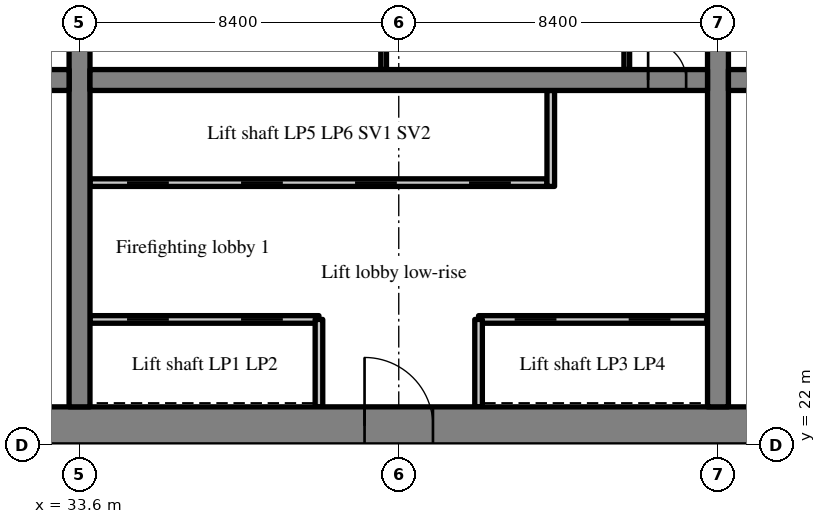
"""IFC4 building model, lengths in metres.
Left out: names, types, materials, properties, quantities, classifications, styles, units other than length and angle.
Written with IfcOpenShell. Run it as: python <this file> out.ifc"""

import sys

from ifc_helpers import new_model, si_unit, direction, frame, frame_2d, origin, place, context, subcontext, project, spatial, rectangle, extrude, source, transform, mapped, element, fill, save


model = new_model("IFC4")
c1 = context("Model", 3, precision=1e-05, world=origin(), true_north=direction((0.0, 1.0)))
c2 = subcontext(c1, "Body", "Model", "MODEL_VIEW")
j1 = project(units=[si_unit("LENGTHUNIT", "METRE"), si_unit("PLANEANGLEUNIT", "RADIAN")], contexts=[c1])
p1 = place(None, origin())
s1 = spatial("IfcSite", under=j1, at=p1, CompositionType="ELEMENT")
p2 = place(p1, origin())
s2 = spatial("IfcBuilding", under=s1, at=p2, CompositionType="ELEMENT")
p3 = place(p2, frame((0.0, 0.0, 77.2)))
s3 = spatial("IfcBuildingStorey", under=s2, at=p3, CompositionType="ELEMENT", Elevation=77.2)
m1 = source(origin(), c2, "Body", "SweptSolid", [
    extrude(rectangle(XDim=50.4, YDim=1.0, at=frame_2d((25.2, 0.0))), origin(), (0.0, 0.0, 1.0), 3.52),
])
p4 = place(p3, frame((25.2, 22.5, 0.0), z_axis=(0.0, 0.0, 1.0), x_axis=(1.0, 0.0, 0.0)))
e1 = element("IfcWall", 1, at=p4, inside=s3, PredefinedType="SHEAR", context=c2, shape_type="MappedRepresentation", body=[
    mapped(m1, transform((0.0, 0.0, 0.0), scale=1.0)),
])
m2 = source(origin(), c2, "Body", "SweptSolid", [
    extrude(rectangle(XDim=1.8, YDim=2.1, at=frame_2d((0.9, 1.05))), frame((0.0, 0.51, 0.0), z_axis=(0.0, -1.0, 0.0), x_axis=(1.0, 0.0, 0.0)), (0.0, 0.0, 1.0), 1.02),
])
p5 = place(p4, frame((15.9, 0.0, 0.0)))
e2 = element("IfcOpeningElement", 2, at=p5, cuts=e1, PredefinedType="OPENING", context=c2, shape_type="MappedRepresentation", body=[
    mapped(m2, transform((0.0, 0.0, 0.0), scale=1.0)),
])
m3 = source(origin(), c2, "Body", "SweptSolid", [
    extrude(rectangle(XDim=1.2, YDim=2.1, at=frame_2d((0.6, 1.05))), frame((0.0, 0.51, 0.0), z_axis=(0.0, -1.0, 0.0), x_axis=(1.0, 0.0, 0.0)), (0.0, 0.0, 1.0), 1.02),
])
p6 = place(p4, frame((26.987, 0.0, 0.0)))
e3 = element("IfcOpeningElement", 3, at=p6, cuts=e1, PredefinedType="OPENING", context=c2, shape_type="MappedRepresentation", body=[
    mapped(m3, transform((0.0, 0.0, 0.0), scale=1.0)),
])
m4 = source(origin(), c2, "Body", "SweptSolid", [
    extrude(rectangle(XDim=0.9, YDim=2.1, at=frame_2d((0.45, 1.05))), frame((0.0, 0.51, 0.0), z_axis=(0.0, -1.0, 0.0), x_axis=(1.0, 0.0, 0.0)), (0.0, 0.0, 1.0), 1.02),
])
p7 = place(p4, frame((32.25, 0.0, 0.0)))
e4 = element("IfcOpeningElement", 4, at=p7, cuts=e1, PredefinedType="OPENING", context=c2, shape_type="MappedRepresentation", body=[
    mapped(m4, transform((0.0, 0.0, 0.0), scale=1.0)),
])
p8 = place(p4, frame((38.262, 0.0, 0.0)))
e5 = element("IfcOpeningElement", 5, at=p8, cuts=e1, PredefinedType="OPENING", context=c2, shape_type="MappedRepresentation", body=[
    mapped(m4, transform((0.0, 0.0, 0.0), scale=1.0)),
])
p9 = place(p4, frame((6.438, 0.0, 0.0)))
e6 = element("IfcOpeningElement", 6, at=p9, cuts=e1, PredefinedType="OPENING", context=c2, shape_type="MappedRepresentation", body=[
    mapped(m3, transform((0.0, 0.0, 0.0), scale=1.0)),
])
p10 = place(p4, frame((47.725, 0.0, 0.0)))
e7 = element("IfcOpeningElement", 7, at=p10, cuts=e1, PredefinedType="OPENING", context=c2, shape_type="MappedRepresentation", body=[
    mapped(m3, transform((0.0, 0.0, 0.0), scale=1.0)),
])
m5 = source(origin(), c2, "Body", "SweptSolid", [
    extrude(rectangle(XDim=18.0, YDim=0.55, at=frame_2d((9.0, 0.0))), origin(), (0.0, 0.0, 1.0), 3.52),
])
p11 = place(p3, frame((33.6, 23.0, 0.0), z_axis=(0.0, 0.0, 1.0), x_axis=(0.0, 1.0, 0.0)))
e8 = element("IfcWall", 8, at=p11, inside=s3, PredefinedType="SHEAR", context=c2, shape_type="MappedRepresentation", body=[
    mapped(m5, transform((0.0, 0.0, 0.0), scale=1.0)),
])
m6 = source(origin(), c2, "Body", "SweptSolid", [
    extrude(rectangle(XDim=1.1, YDim=2.1, at=frame_2d((0.55, 1.05))), frame((0.0, 0.285, 0.0), z_axis=(0.0, -1.0, 0.0), x_axis=(1.0, 0.0, 0.0)), (0.0, 0.0, 1.0), 0.57),
])
p12 = place(p11, frame((12.45, 0.0, 0.0)))
e9 = element("IfcOpeningElement", 9, at=p12, cuts=e8, PredefinedType="OPENING", context=c2, shape_type="MappedRepresentation", body=[
    mapped(m6, transform((0.0, 0.0, 0.0), scale=1.0)),
])
p13 = place(p3, frame((50.4, 23.0, 0.0), z_axis=(0.0, 0.0, 1.0), x_axis=(0.0, 1.0, 0.0)))
e10 = element("IfcWall", 10, at=p13, inside=s3, PredefinedType="SHEAR", context=c2, shape_type="MappedRepresentation", body=[
    mapped(m5, transform((0.0, 0.0, 0.0), scale=1.0)),
])
p14 = place(p13, frame((12.45, 0.0, 0.0)))
e11 = element("IfcOpeningElement", 11, at=p14, cuts=e10, PredefinedType="OPENING", context=c2, shape_type="MappedRepresentation", body=[
    mapped(m6, transform((0.0, 0.0, 0.0), scale=1.0)),
])
m7 = source(origin(), c2, "Body", "SweptSolid", [
    extrude(rectangle(XDim=7.125, YDim=0.55, at=frame_2d((3.562, 0.0))), origin(), (0.0, 0.0, 1.0), 3.52),
])
p15 = place(p3, frame((26.2, 31.6, 0.0), z_axis=(0.0, 0.0, 1.0), x_axis=(1.0, 0.0, 0.0)))
e12 = element("IfcWall", 12, at=p15, inside=s3, PredefinedType="SHEAR", context=c2, shape_type="MappedRepresentation", body=[
    mapped(m7, transform((0.0, 0.0, 0.0), scale=1.0)),
])
p16 = place(p15, frame((5.488, 0.0, 0.0)))
e13 = element("IfcOpeningElement", 13, at=p16, cuts=e12, PredefinedType="OPENING", context=c2, shape_type="MappedRepresentation", body=[
    mapped(m6, transform((0.0, 0.0, 0.0), scale=1.0)),
])
m8 = source(origin(), c2, "Body", "SweptSolid", [
    extrude(rectangle(XDim=16.25, YDim=0.55, at=frame_2d((8.125, 0.0))), origin(), (0.0, 0.0, 1.0), 3.52),
])
p17 = place(p3, frame((33.875, 31.6, 0.0), z_axis=(0.0, 0.0, 1.0), x_axis=(1.0, 0.0, 0.0)))
e14 = element("IfcWall", 14, at=p17, inside=s3, PredefinedType="SHEAR", context=c2, shape_type="MappedRepresentation", body=[
    mapped(m8, transform((0.0, 0.0, 0.0), scale=1.0)),
])
m9 = source(origin(), c2, "Body", "SweptSolid", [
    extrude(rectangle(XDim=1.0, YDim=2.1, at=frame_2d((0.5, 1.05))), frame((0.0, 0.285, 0.0), z_axis=(0.0, -1.0, 0.0), x_axis=(1.0, 0.0, 0.0)), (0.0, 0.0, 1.0), 0.57),
])
p18 = place(p17, frame((14.687, 0.0, 0.0)))
e15 = element("IfcOpeningElement", 15, at=p18, cuts=e14, PredefinedType="OPENING", context=c2, shape_type="MappedRepresentation", body=[
    mapped(m9, transform((0.0, 0.0, 0.0), scale=1.0)),
])
p19 = place(p3, frame((50.675, 31.6, 0.0), z_axis=(0.0, 0.0, 1.0), x_axis=(1.0, 0.0, 0.0)))
e16 = element("IfcWall", 16, at=p19, inside=s3, PredefinedType="SHEAR", context=c2, shape_type="MappedRepresentation", body=[
    mapped(m8, transform((0.0, 0.0, 0.0), scale=1.0)),
])
p20 = place(p19, frame((0.562, 0.0, 0.0)))
e17 = element("IfcOpeningElement", 17, at=p20, cuts=e16, PredefinedType="OPENING", context=c2, shape_type="MappedRepresentation", body=[
    mapped(m9, transform((0.0, 0.0, 0.0), scale=1.0)),
])
m10 = source(origin(), c2, "Body", "SweptSolid", [
    extrude(rectangle(XDim=6.025, YDim=0.2, at=frame_2d((3.012, 0.0))), origin(), (0.0, 0.0, 1.0), 3.52),
])
p21 = place(p3, frame((33.875, 25.3, 0.0), z_axis=(0.0, 0.0, 1.0), x_axis=(1.0, 0.0, 0.0)))
e18 = element("IfcWall", 18, at=p21, inside=s3, PredefinedType="SOLIDWALL", context=c2, shape_type="MappedRepresentation", body=[
    mapped(m10, transform((0.0, 0.0, 0.0), scale=1.0)),
])
m11 = source(origin(), c2, "Body", "SweptSolid", [
    extrude(rectangle(XDim=1.1, YDim=2.1, at=frame_2d((0.55, 1.05))), frame((0.0, 0.11, 0.0), z_axis=(0.0, -1.0, 0.0), x_axis=(1.0, 0.0, 0.0)), (0.0, 0.0, 1.0), 0.22),
])
p22 = place(p21, frame((0.975, 0.0, 0.0)))
e19 = element("IfcOpeningElement", 19, at=p22, cuts=e18, PredefinedType="OPENING", context=c2, shape_type="MappedRepresentation", body=[
    mapped(m11, transform((0.0, 0.0, 0.0), scale=1.0)),
])
p23 = place(p21, frame((3.975, 0.0, 0.0)))
e20 = element("IfcOpeningElement", 20, at=p23, cuts=e18, PredefinedType="OPENING", context=c2, shape_type="MappedRepresentation", body=[
    mapped(m11, transform((0.0, 0.0, 0.0), scale=1.0)),
])
m12 = source(origin(), c2, "Body", "SweptSolid", [
    extrude(rectangle(XDim=6.0, YDim=0.2, at=frame_2d((3.0, 0.0))), origin(), (0.0, 0.0, 1.0), 3.52),
])
p24 = place(p3, frame((44.1, 25.3, 0.0), z_axis=(0.0, 0.0, 1.0), x_axis=(1.0, 0.0, 0.0)))
e21 = element("IfcWall", 21, at=p24, inside=s3, PredefinedType="SOLIDWALL", context=c2, shape_type="MappedRepresentation", body=[
    mapped(m12, transform((0.0, 0.0, 0.0), scale=1.0)),
])
p25 = place(p24, frame((0.95, 0.0, 0.0)))
e22 = element("IfcOpeningElement", 22, at=p25, cuts=e21, PredefinedType="OPENING", context=c2, shape_type="MappedRepresentation", body=[
    mapped(m11, transform((0.0, 0.0, 0.0), scale=1.0)),
])
p26 = place(p24, frame((3.95, 0.0, 0.0)))
e23 = element("IfcOpeningElement", 23, at=p26, cuts=e21, PredefinedType="OPENING", context=c2, shape_type="MappedRepresentation", body=[
    mapped(m11, transform((0.0, 0.0, 0.0), scale=1.0)),
])
m13 = source(origin(), c2, "Body", "SweptSolid", [
    extrude(rectangle(XDim=12.025, YDim=0.2, at=frame_2d((6.012, 0.0))), origin(), (0.0, 0.0, 1.0), 3.52),
])
p27 = place(p3, frame((33.875, 28.9, 0.0), z_axis=(0.0, 0.0, 1.0), x_axis=(1.0, 0.0, 0.0)))
e24 = element("IfcWall", 24, at=p27, inside=s3, PredefinedType="SOLIDWALL", context=c2, shape_type="MappedRepresentation", body=[
    mapped(m13, transform((0.0, 0.0, 0.0), scale=1.0)),
])
p28 = place(p27, frame((0.975, 0.0, 0.0)))
e25 = element("IfcOpeningElement", 25, at=p28, cuts=e24, PredefinedType="OPENING", context=c2, shape_type="MappedRepresentation", body=[
    mapped(m11, transform((0.0, 0.0, 0.0), scale=1.0)),
])
p29 = place(p27, frame((3.975, 0.0, 0.0)))
e26 = element("IfcOpeningElement", 26, at=p29, cuts=e24, PredefinedType="OPENING", context=c2, shape_type="MappedRepresentation", body=[
    mapped(m11, transform((0.0, 0.0, 0.0), scale=1.0)),
])
p30 = place(p27, frame((6.975, 0.0, 0.0)))
e27 = element("IfcOpeningElement", 27, at=p30, cuts=e24, PredefinedType="OPENING", context=c2, shape_type="MappedRepresentation", body=[
    mapped(m11, transform((0.0, 0.0, 0.0), scale=1.0)),
])
p31 = place(p27, frame((9.975, 0.0, 0.0)))
e28 = element("IfcOpeningElement", 28, at=p31, cuts=e24, PredefinedType="OPENING", context=c2, shape_type="MappedRepresentation", body=[
    mapped(m11, transform((0.0, 0.0, 0.0), scale=1.0)),
])
m14 = source(origin(), c2, "Body", "SweptSolid", [
    extrude(rectangle(XDim=2.3, YDim=0.2, at=frame_2d((1.15, 0.0))), origin(), (0.0, 0.0, 1.0), 3.52),
])
for number, where, z_axis, x_axis in (
    (29, (39.9, 23.0, 0.0), (0.0, 0.0, 1.0), (0.0, 1.0, 0.0)),
    (30, (44.1, 23.0, 0.0), (0.0, 0.0, 1.0), (0.0, 1.0, 0.0)),
):
    element("IfcWall", number, at=place(p3, frame(where, z_axis=z_axis, x_axis=x_axis)), inside=s3, PredefinedType="SOLIDWALL", context=c2, shape_type="MappedRepresentation", body=[
        mapped(m14, transform((0.0, 0.0, 0.0), scale=1.0)),
    ])
m15 = source(origin(), c2, "Body", "SweptSolid", [
    extrude(rectangle(XDim=2.525, YDim=0.2, at=frame_2d((1.262, 0.0))), origin(), (0.0, 0.0, 1.0), 3.52),
])
p32 = place(p3, frame((46.0, 28.8, 0.0), z_axis=(0.0, 0.0, 1.0), x_axis=(0.0, 1.0, 0.0)))
e31 = element("IfcWall", 31, at=p32, inside=s3, PredefinedType="SOLIDWALL", context=c2, shape_type="MappedRepresentation", body=[
    mapped(m15, transform((0.0, 0.0, 0.0), scale=1.0)),
])
m16 = source(origin(), c2, "Body", "SweptSolid", [
    extrude(rectangle(XDim=3.125, YDim=0.15, at=frame_2d((1.562, 0.0))), origin(), (0.0, 0.0, 1.0), 3.52),
])
for number, where, z_axis, x_axis in (
    (32, (48.0, 31.875, 0.0), (0.0, 0.0, 1.0), (0.0, 1.0, 0.0)),
    (33, (41.602, 31.875, 0.0), (0.0, 0.0, 1.0), (0.0, 1.0, 0.0)),
):
    element("IfcWall", number, at=place(p3, frame(where, z_axis=z_axis, x_axis=x_axis)), inside=s3, PredefinedType="PARTITIONING", context=c2, shape_type="MappedRepresentation", body=[
        mapped(m16, transform((0.0, 0.0, 0.0), scale=1.0)),
    ])
m17 = source(origin(), c2, "Body", "SweptSolid", [
    extrude(rectangle(XDim=1.8, YDim=2.1, at=frame_2d((0.9, 1.05))), frame((0.0, 0.375, 0.0), z_axis=(0.0, -1.0, 0.0), x_axis=(1.0, 0.0, 0.0)), (0.0, 0.0, 1.0), 0.05),
])
p33 = place(p5, origin())
e34 = element("IfcDoor", 34, at=p33, inside=s3, OperationType="DOUBLE_DOOR_SINGLE_SWING", PredefinedType="DOOR", context=c2, shape_type="MappedRepresentation", body=[
    mapped(m17, transform((0.0, 0.0, 0.0), scale=1.0)),
])
fill(e2, e34)
m18 = source(origin(), c2, "Body", "SweptSolid", [
    extrude(rectangle(XDim=1.0, YDim=2.1, at=frame_2d((0.5, 1.05))), frame((0.0, 0.025, 0.0), z_axis=(0.0, -1.0, 0.0), x_axis=(1.0, 0.0, 0.0)), (0.0, 0.0, 1.0), 0.05),
])
p34 = place(p18, origin())
e35 = element("IfcDoor", 35, at=p34, inside=s3, OperationType="SINGLE_SWING_LEFT", PredefinedType="DOOR", context=c2, shape_type="MappedRepresentation", body=[
    mapped(m18, transform((0.0, 0.0, 0.0), scale=1.0)),
])
fill(e15, e35)
m19 = source(origin(), c2, "Body", "SweptSolid", [
    extrude(rectangle(XDim=1.1, YDim=2.1, at=frame_2d((0.55, 1.05))), frame((0.0, 0.025, 0.0), z_axis=(0.0, -1.0, 0.0), x_axis=(1.0, 0.0, 0.0)), (0.0, 0.0, 1.0), 0.05),
])
p35 = place(p22, origin())
e36 = element("IfcDoor", 36, at=p35, inside=s3, OperationType="SLIDING_TO_LEFT", PredefinedType="DOOR", context=c2, shape_type="MappedRepresentation", body=[
    mapped(m19, transform((0.0, 0.0, 0.0), scale=1.0)),
])
fill(e19, e36)
p36 = place(p23, origin())
e37 = element("IfcDoor", 37, at=p36, inside=s3, OperationType="SLIDING_TO_RIGHT", PredefinedType="DOOR", context=c2, shape_type="MappedRepresentation", body=[
    mapped(m19, transform((0.0, 0.0, 0.0), scale=1.0)),
])
fill(e20, e37)
p37 = place(p25, origin())
e38 = element("IfcDoor", 38, at=p37, inside=s3, OperationType="SLIDING_TO_LEFT", PredefinedType="DOOR", context=c2, shape_type="MappedRepresentation", body=[
    mapped(m19, transform((0.0, 0.0, 0.0), scale=1.0)),
])
fill(e22, e38)
p38 = place(p26, origin())
e39 = element("IfcDoor", 39, at=p38, inside=s3, OperationType="SLIDING_TO_RIGHT", PredefinedType="DOOR", context=c2, shape_type="MappedRepresentation", body=[
    mapped(m19, transform((0.0, 0.0, 0.0), scale=1.0)),
])
fill(e23, e39)
p39 = place(p28, origin())
e40 = element("IfcDoor", 40, at=p39, inside=s3, OperationType="SLIDING_TO_LEFT", PredefinedType="DOOR", context=c2, shape_type="MappedRepresentation", body=[
    mapped(m19, transform((0.0, 0.0, 0.0), scale=1.0)),
])
fill(e25, e40)
p40 = place(p29, origin())
e41 = element("IfcDoor", 41, at=p40, inside=s3, OperationType="SLIDING_TO_RIGHT", PredefinedType="DOOR", context=c2, shape_type="MappedRepresentation", body=[
    mapped(m19, transform((0.0, 0.0, 0.0), scale=1.0)),
])
fill(e26, e41)
p41 = place(p30, origin())
e42 = element("IfcDoor", 42, at=p41, inside=s3, OperationType="SLIDING_TO_LEFT", PredefinedType="DOOR", context=c2, shape_type="MappedRepresentation", body=[
    mapped(m19, transform((0.0, 0.0, 0.0), scale=1.0)),
])
fill(e27, e42)
p42 = place(p31, origin())
e43 = element("IfcDoor", 43, at=p42, inside=s3, OperationType="SLIDING_TO_RIGHT", PredefinedType="DOOR", context=c2, shape_type="MappedRepresentation", body=[
    mapped(m19, transform((0.0, 0.0, 0.0), scale=1.0)),
])
fill(e28, e43)
save(model, sys.argv[1])
